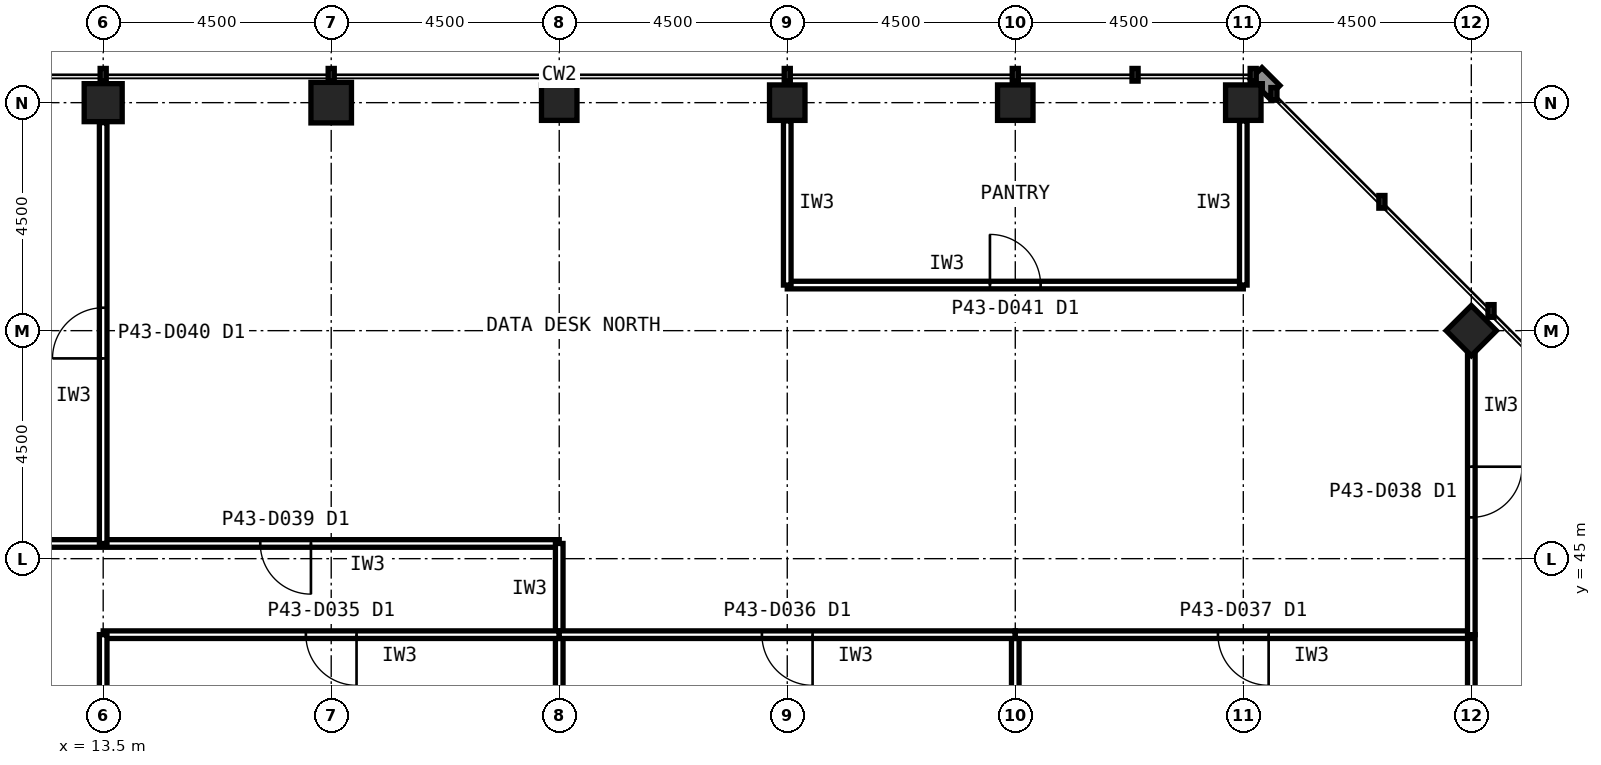
"""IFC4 building model, lengths in metres.
Left out: names, types, materials, properties, quantities, classifications, styles, units other than length and angle.
Written with IfcOpenShell. Run it as: python <this file> out.ifc"""

import sys

from ifc_helpers import new_model, si_unit, direction, frame, frame_2d, origin, origin_2d, place, context, subcontext, project, spatial, rectangle, hollow_rectangle, extrude, element, fill, save


model = new_model("IFC4")
c1 = context("Model", 3, precision=1e-05, world=origin(), true_north=direction((0.0, 1.0)))
c2 = subcontext(c1, "Body", "Model", "MODEL_VIEW")
j1 = project(units=[si_unit("LENGTHUNIT", "METRE"), si_unit("PLANEANGLEUNIT", "RADIAN")], contexts=[c1])
p1 = place(None, origin())
s1 = spatial("IfcSite", under=j1, at=p1, CompositionType="ELEMENT")
p2 = place(p1, origin())
s2 = spatial("IfcBuilding", under=s1, at=p2, CompositionType="ELEMENT")
p3 = place(p2, frame((0.0, 0.0, 183.6)))
s3 = spatial("IfcBuildingStorey", under=s2, at=p3, CompositionType="ELEMENT", Elevation=183.6)
for number, where, z_axis, x_axis in (
    (1, (36.0, 54.0, 0.0), (0.0, 0.0, 1.0), (1.0, 0.0, 0.0)),
    (2, (31.5, 54.0, 0.0), (0.0, 0.0, 1.0), (1.0, 0.0, 0.0)),
    (3, (27.0, 54.0, 0.0), (0.0, 0.0, 1.0), (1.0, 0.0, 0.0)),
    (4, (22.5, 54.0, 0.0), (0.0, 0.0, 1.0), (1.0, 0.0, 0.0)),
):
    element("IfcColumn", number, at=place(p3, frame(where, z_axis=z_axis, x_axis=x_axis)), inside=s3, PredefinedType="COLUMN", context=c2, shape_type="SweptSolid", body=[
        extrude(hollow_rectangle(XDim=0.7, YDim=0.7, WallThickness=0.036, at=origin_2d()), origin(), (0.0, 0.0, 1.0), 4.0),
    ])
p4 = place(p3, frame((18.0, 54.0, 0.0), z_axis=(0.0, 0.0, 1.0), x_axis=(1.0, 0.0, 0.0)))
e5 = element("IfcColumn", 5, at=p4, inside=s3, PredefinedType="COLUMN", context=c2, shape_type="SweptSolid", body=[
    extrude(hollow_rectangle(XDim=0.8, YDim=0.8, WallThickness=0.045, at=origin_2d()), origin(), (0.0, 0.0, 1.0), 4.0),
])
p5 = place(p3, frame((13.5, 54.0, 0.0), z_axis=(0.0, 0.0, 1.0), x_axis=(1.0, 0.0, 0.0)))
e6 = element("IfcColumn", 6, at=p5, inside=s3, PredefinedType="COLUMN", context=c2, shape_type="SweptSolid", body=[
    extrude(hollow_rectangle(XDim=0.75, YDim=0.75, WallThickness=0.04, at=origin_2d()), origin(), (0.0, 0.0, 1.0), 4.0),
])
p6 = place(p3, frame((40.5, 49.5, 0.0), z_axis=(0.0, 0.0, 1.0), x_axis=(0.707106781187, 0.707106781187, 0.0)))
e7 = element("IfcColumn", 7, at=p6, inside=s3, PredefinedType="COLUMN", context=c2, shape_type="SweptSolid", body=[
    extrude(hollow_rectangle(XDim=0.7, YDim=0.7, WallThickness=0.036, at=origin_2d()), origin(), (0.0, 0.0, 1.0), 4.0),
])
p7 = place(p3, frame((22.5, 45.3, 0.0), z_axis=(0.0, 0.0, 1.0), x_axis=(-1.0, 0.0, 0.0)))
e8 = element("IfcWall", 8, at=p7, inside=s3, PredefinedType="PARTITIONING", context=c2, shape_type="SweptSolid", body=[
    extrude(rectangle(XDim=10.8, YDim=0.15, at=frame_2d((5.4, 0.0))), origin(), (0.0, 0.0, 1.0), 3.84),
])
p8 = place(p7, frame((4.9, 0.0, 0.0)))
e9 = element("IfcOpeningElement", 9, at=p8, cuts=e8, PredefinedType="OPENING", context=c2, shape_type="SweptSolid", body=[
    extrude(rectangle(XDim=1.0, YDim=2.1, at=frame_2d((0.5, 1.05))), frame((0.0, 0.085, 0.0), z_axis=(0.0, -1.0, 0.0), x_axis=(1.0, 0.0, 0.0)), (0.0, 0.0, 1.0), 0.17),
])
p9 = place(p3, frame((22.5, 43.5, 0.0), z_axis=(0.0, 0.0, 1.0), x_axis=(0.0, 1.0, 0.0)))
e10 = element("IfcWall", 10, at=p9, inside=s3, PredefinedType="PARTITIONING", context=c2, shape_type="SweptSolid", body=[
    extrude(rectangle(XDim=1.8, YDim=0.15, at=frame_2d((0.9, 0.0))), origin(), (0.0, 0.0, 1.0), 2.989),
])
p10 = place(p3, frame((22.5, 40.5, 0.0), z_axis=(0.0, 0.0, 1.0), x_axis=(0.0, 1.0, 0.0)))
e11 = element("IfcWall", 11, at=p10, inside=s3, PredefinedType="PARTITIONING", context=c2, shape_type="SweptSolid", body=[
    extrude(rectangle(XDim=3.0, YDim=0.15, at=frame_2d((1.5, 0.0))), origin(), (0.0, 0.0, 1.0), 2.989),
])
p11 = place(p3, frame((22.5, 43.5, 0.0), z_axis=(0.0, 0.0, 1.0), x_axis=(-1.0, 0.0, 0.0)))
e12 = element("IfcWall", 12, at=p11, inside=s3, PredefinedType="PARTITIONING", context=c2, shape_type="SweptSolid", body=[
    extrude(rectangle(XDim=9.0, YDim=0.15, at=frame_2d((4.5, 0.0))), origin(), (0.0, 0.0, 1.0), 3.84),
])
p12 = place(p11, frame((4.0, 0.0, 0.0)))
e13 = element("IfcOpeningElement", 13, at=p12, cuts=e12, PredefinedType="OPENING", context=c2, shape_type="SweptSolid", body=[
    extrude(rectangle(XDim=1.0, YDim=2.1, at=frame_2d((0.5, 1.05))), frame((0.0, 0.085, 0.0), z_axis=(0.0, -1.0, 0.0), x_axis=(1.0, 0.0, 0.0)), (0.0, 0.0, 1.0), 0.17),
])
for number, where, z_axis, x_axis in (
    (14, (13.5, 43.5, 0.0), (0.0, 0.0, 1.0), (0.0, -1.0, 0.0)),
    (15, (31.5, 40.5, 0.0), (0.0, 0.0, 1.0), (0.0, 1.0, 0.0)),
):
    element("IfcWall", number, at=place(p3, frame(where, z_axis=z_axis, x_axis=x_axis)), inside=s3, PredefinedType="PARTITIONING", context=c2, shape_type="SweptSolid", body=[
        extrude(rectangle(XDim=3.0, YDim=0.15, at=frame_2d((1.5, 0.0))), origin(), (0.0, 0.0, 1.0), 2.989),
    ])
p13 = place(p3, frame((31.5, 43.5, 0.0), z_axis=(0.0, 0.0, 1.0), x_axis=(-1.0, 0.0, 0.0)))
e16 = element("IfcWall", 16, at=p13, inside=s3, PredefinedType="PARTITIONING", context=c2, shape_type="SweptSolid", body=[
    extrude(rectangle(XDim=9.0, YDim=0.15, at=frame_2d((4.5, 0.0))), origin(), (0.0, 0.0, 1.0), 3.84),
])
p14 = place(p13, frame((4.0, 0.0, 0.0)))
e17 = element("IfcOpeningElement", 17, at=p14, cuts=e16, PredefinedType="OPENING", context=c2, shape_type="SweptSolid", body=[
    extrude(rectangle(XDim=1.0, YDim=2.1, at=frame_2d((0.5, 1.05))), frame((0.0, 0.085, 0.0), z_axis=(0.0, -1.0, 0.0), x_axis=(1.0, 0.0, 0.0)), (0.0, 0.0, 1.0), 0.17),
])
p15 = place(p3, frame((40.5, 40.5, 0.0), z_axis=(0.0, 0.0, 1.0), x_axis=(0.0, 1.0, 0.0)))
e18 = element("IfcWall", 18, at=p15, inside=s3, PredefinedType="PARTITIONING", context=c2, shape_type="SweptSolid", body=[
    extrude(rectangle(XDim=3.0, YDim=0.15, at=frame_2d((1.5, 0.0))), origin(), (0.0, 0.0, 1.0), 2.989),
])
p16 = place(p3, frame((40.5, 43.5, 0.0), z_axis=(0.0, 0.0, 1.0), x_axis=(-1.0, 0.0, 0.0)))
e19 = element("IfcWall", 19, at=p16, inside=s3, PredefinedType="PARTITIONING", context=c2, shape_type="SweptSolid", body=[
    extrude(rectangle(XDim=9.0, YDim=0.15, at=frame_2d((4.5, 0.0))), origin(), (0.0, 0.0, 1.0), 3.84),
])
p17 = place(p16, frame((4.0, 0.0, 0.0)))
e20 = element("IfcOpeningElement", 20, at=p17, cuts=e19, PredefinedType="OPENING", context=c2, shape_type="SweptSolid", body=[
    extrude(rectangle(XDim=1.0, YDim=2.1, at=frame_2d((0.5, 1.05))), frame((0.0, 0.085, 0.0), z_axis=(0.0, -1.0, 0.0), x_axis=(1.0, 0.0, 0.0)), (0.0, 0.0, 1.0), 0.17),
])
p18 = place(p3, frame((27.0, 50.4, 0.0), z_axis=(0.0, 0.0, 1.0), x_axis=(1.0, 0.0, 0.0)))
e21 = element("IfcWall", 21, at=p18, inside=s3, PredefinedType="PARTITIONING", context=c2, shape_type="SweptSolid", body=[
    extrude(rectangle(XDim=9.0, YDim=0.15, at=frame_2d((4.5, 0.0))), origin(), (0.0, 0.0, 1.0), 3.84),
])
p19 = place(p18, frame((4.0, 0.0, 0.0)))
e22 = element("IfcOpeningElement", 22, at=p19, cuts=e21, PredefinedType="OPENING", context=c2, shape_type="SweptSolid", body=[
    extrude(rectangle(XDim=1.0, YDim=2.1, at=frame_2d((0.5, 1.05))), frame((0.0, 0.085, 0.0), z_axis=(0.0, -1.0, 0.0), x_axis=(1.0, 0.0, 0.0)), (0.0, 0.0, 1.0), 0.17),
])
for number, where, z_axis, x_axis in (
    (23, (36.0, 50.4, 0.0), (0.0, 0.0, 1.0), (0.0, 1.0, 0.0)),
    (24, (27.0, 53.64, 0.0), (0.0, 0.0, 1.0), (0.0, -1.0, 0.0)),
):
    element("IfcWall", number, at=place(p3, frame(where, z_axis=z_axis, x_axis=x_axis)), inside=s3, PredefinedType="PARTITIONING", context=c2, shape_type="SweptSolid", body=[
        extrude(rectangle(XDim=3.24, YDim=0.15, at=frame_2d((1.62, 0.0))), origin(), (0.0, 0.0, 1.0), 2.989),
    ])
p20 = place(p3, frame((40.5, 49.13, 0.0), z_axis=(0.0, 0.0, 1.0), x_axis=(0.0, -1.0, 0.0)))
e25 = element("IfcWall", 25, at=p20, inside=s3, PredefinedType="PARTITIONING", context=c2, shape_type="SweptSolid", body=[
    extrude(rectangle(XDim=5.63, YDim=0.15, at=frame_2d((2.815, 0.0))), origin(), (0.0, 0.0, 1.0), 2.989),
])
p21 = place(p20, frame((2.315, 0.0, 0.0)))
e26 = element("IfcOpeningElement", 26, at=p21, cuts=e25, PredefinedType="OPENING", context=c2, shape_type="SweptSolid", body=[
    extrude(rectangle(XDim=1.0, YDim=2.1, at=frame_2d((0.5, 1.05))), frame((0.0, 0.085, 0.0), z_axis=(0.0, -1.0, 0.0), x_axis=(1.0, 0.0, 0.0)), (0.0, 0.0, 1.0), 0.17),
])
p22 = place(p3, frame((13.5, 45.3, 0.0), z_axis=(0.0, 0.0, 1.0), x_axis=(0.0, 1.0, 0.0)))
e27 = element("IfcWall", 27, at=p22, inside=s3, PredefinedType="PARTITIONING", context=c2, shape_type="SweptSolid", body=[
    extrude(rectangle(XDim=8.305, YDim=0.15, at=frame_2d((4.152, 0.0))), origin(), (0.0, 0.0, 1.0), 2.989),
])
p23 = place(p22, frame((3.653, 0.0, 0.0)))
e28 = element("IfcOpeningElement", 28, at=p23, cuts=e27, PredefinedType="OPENING", context=c2, shape_type="SweptSolid", body=[
    extrude(rectangle(XDim=1.0, YDim=2.1, at=frame_2d((0.5, 1.05))), frame((0.0, 0.085, 0.0), z_axis=(0.0, -1.0, 0.0), x_axis=(1.0, 0.0, 0.0)), (0.0, 0.0, 1.0), 0.17),
])
p24 = place(p8, origin())
e29 = element("IfcDoor", 29, at=p24, inside=s3, OperationType="SINGLE_SWING_LEFT", PredefinedType="DOOR", context=c2, shape_type="SweptSolid", body=[
    extrude(rectangle(XDim=1.0, YDim=2.1, at=frame_2d((0.5, 1.05))), frame((0.0, 0.025, 0.0), z_axis=(0.0, -1.0, 0.0), x_axis=(1.0, 0.0, 0.0)), (0.0, 0.0, 1.0), 0.05),
])
fill(e9, e29)
p25 = place(p12, origin())
e30 = element("IfcDoor", 30, at=p25, inside=s3, OperationType="SINGLE_SWING_LEFT", PredefinedType="DOOR", context=c2, shape_type="SweptSolid", body=[
    extrude(rectangle(XDim=1.0, YDim=2.1, at=frame_2d((0.5, 1.05))), frame((0.0, 0.025, 0.0), z_axis=(0.0, -1.0, 0.0), x_axis=(1.0, 0.0, 0.0)), (0.0, 0.0, 1.0), 0.05),
])
fill(e13, e30)
p26 = place(p14, origin())
e31 = element("IfcDoor", 31, at=p26, inside=s3, OperationType="SINGLE_SWING_LEFT", PredefinedType="DOOR", context=c2, shape_type="SweptSolid", body=[
    extrude(rectangle(XDim=1.0, YDim=2.1, at=frame_2d((0.5, 1.05))), frame((0.0, 0.025, 0.0), z_axis=(0.0, -1.0, 0.0), x_axis=(1.0, 0.0, 0.0)), (0.0, 0.0, 1.0), 0.05),
])
fill(e17, e31)
p27 = place(p17, origin())
e32 = element("IfcDoor", 32, at=p27, inside=s3, OperationType="SINGLE_SWING_LEFT", PredefinedType="DOOR", context=c2, shape_type="SweptSolid", body=[
    extrude(rectangle(XDim=1.0, YDim=2.1, at=frame_2d((0.5, 1.05))), frame((0.0, 0.025, 0.0), z_axis=(0.0, -1.0, 0.0), x_axis=(1.0, 0.0, 0.0)), (0.0, 0.0, 1.0), 0.05),
])
fill(e20, e32)
p28 = place(p19, origin())
e33 = element("IfcDoor", 33, at=p28, inside=s3, OperationType="SINGLE_SWING_LEFT", PredefinedType="DOOR", context=c2, shape_type="SweptSolid", body=[
    extrude(rectangle(XDim=1.0, YDim=2.1, at=frame_2d((0.5, 1.05))), frame((0.0, 0.025, 0.0), z_axis=(0.0, -1.0, 0.0), x_axis=(1.0, 0.0, 0.0)), (0.0, 0.0, 1.0), 0.05),
])
fill(e22, e33)
p29 = place(p21, origin())
e34 = element("IfcDoor", 34, at=p29, inside=s3, OperationType="SINGLE_SWING_LEFT", PredefinedType="DOOR", context=c2, shape_type="SweptSolid", body=[
    extrude(rectangle(XDim=1.0, YDim=2.1, at=frame_2d((0.5, 1.05))), frame((0.0, 0.025, 0.0), z_axis=(0.0, -1.0, 0.0), x_axis=(1.0, 0.0, 0.0)), (0.0, 0.0, 1.0), 0.05),
])
fill(e26, e34)
p30 = place(p23, origin())
e35 = element("IfcDoor", 35, at=p30, inside=s3, OperationType="SINGLE_SWING_LEFT", PredefinedType="DOOR", context=c2, shape_type="SweptSolid", body=[
    extrude(rectangle(XDim=1.0, YDim=2.1, at=frame_2d((0.5, 1.05))), frame((0.0, 0.025, 0.0), z_axis=(0.0, -1.0, 0.0), x_axis=(1.0, 0.0, 0.0)), (0.0, 0.0, 1.0), 0.05),
])
fill(e28, e35)
save(model, sys.argv[1])
